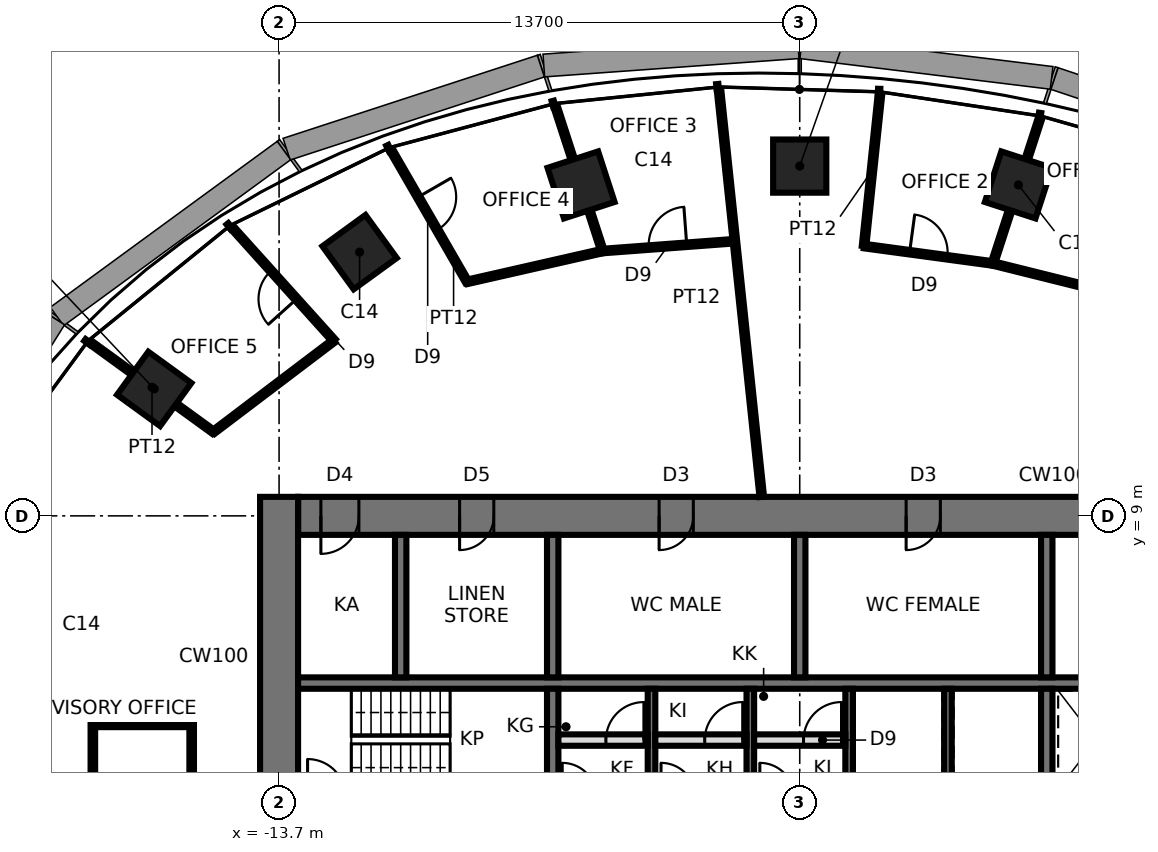
"""IFC4 building model, lengths in metres.
Left out: names, types, materials, properties, quantities, classifications, styles, units other than length and angle.
Written with IfcOpenShell. Run it as: python <this file> out.ifc"""

import sys

from ifc_helpers import new_model, si_unit, direction, frame, frame_2d, origin, origin_2d, place, context, subcontext, project, spatial, rectangle, extrude, element, fill, save


model = new_model("IFC4")
c1 = context("Model", 3, precision=1e-05, world=origin(), true_north=direction((0.0, 1.0)))
c2 = subcontext(c1, "Body", "Model", "MODEL_VIEW")
j1 = project(units=[si_unit("LENGTHUNIT", "METRE"), si_unit("PLANEANGLEUNIT", "RADIAN")], contexts=[c1])
p1 = place(None, origin())
s1 = spatial("IfcSite", under=j1, at=p1, CompositionType="ELEMENT")
p2 = place(p1, origin())
s2 = spatial("IfcBuilding", under=s1, at=p2, CompositionType="ELEMENT")
p3 = place(p2, frame((0.0, 0.0, 187.7)))
s3 = spatial("IfcBuildingStorey", under=s2, at=p3, CompositionType="ELEMENT", Elevation=187.7)
for number, where, z_axis, x_axis in (
    (1, (5.754, 17.708, 0.0), (0.0, 0.0, 1.0), (0.309, 0.951, 0.0)),
    (2, (0.0, 18.204, 0.0), (0.0, 0.0, 1.0), (0.0, 1.0, 0.0)),
    (3, (-5.754, 17.708, 0.0), (0.0, 0.0, 1.0), (-0.309, 0.951, 0.0)),
    (4, (-11.581, 15.94, 0.0), (0.0, 0.0, 1.0), (-0.588, 0.809, 0.0)),
    (5, (-16.986, 12.341, 0.0), (0.0, 0.0, 1.0), (-0.809, 0.588, 0.0)),
):
    element("IfcColumn", number, at=place(p3, frame(where, z_axis=z_axis, x_axis=x_axis)), inside=s3, PredefinedType="COLUMN", context=c2, shape_type="SweptSolid", body=[
        extrude(rectangle(XDim=1.4, YDim=1.4, at=origin_2d()), origin(), (0.0, 0.0, 1.0), 3.9),
    ])
p4 = place(p3, frame((13.2, 9.0, 0.0), z_axis=(0.0, 0.0, 1.0), x_axis=(-1.0, 0.0, 0.0)))
e6 = element("IfcWall", 6, at=p4, inside=s3, PredefinedType="SHEAR", context=c2, shape_type="SweptSolid", body=[
    extrude(rectangle(XDim=26.4, YDim=1.0, at=frame_2d((13.2, 0.0))), origin(), (0.0, 0.0, 1.0), 3.9),
])
p5 = place(p4, frame((2.65, 0.0, 0.0)))
e7 = element("IfcOpeningElement", 7, at=p5, cuts=e6, PredefinedType="OPENING", context=c2, shape_type="SweptSolid", body=[
    extrude(rectangle(XDim=0.9, YDim=2.1, at=frame_2d((0.45, 1.05))), frame((0.0, 0.51, 0.0), z_axis=(0.0, -1.0, 0.0), x_axis=(1.0, 0.0, 0.0)), (0.0, 0.0, 1.0), 1.02),
])
p6 = place(p4, frame((9.5, 0.0, 0.0)))
e8 = element("IfcOpeningElement", 8, at=p6, cuts=e6, PredefinedType="OPENING", context=c2, shape_type="SweptSolid", body=[
    extrude(rectangle(XDim=0.9, YDim=2.1, at=frame_2d((0.45, 1.05))), frame((0.0, 0.51, 0.0), z_axis=(0.0, -1.0, 0.0), x_axis=(1.0, 0.0, 0.0)), (0.0, 0.0, 1.0), 1.02),
])
p7 = place(p4, frame((16.0, 0.0, 0.0)))
e9 = element("IfcOpeningElement", 9, at=p7, cuts=e6, PredefinedType="OPENING", context=c2, shape_type="SweptSolid", body=[
    extrude(rectangle(XDim=0.9, YDim=2.1, at=frame_2d((0.45, 1.05))), frame((0.0, 0.51, 0.0), z_axis=(0.0, -1.0, 0.0), x_axis=(1.0, 0.0, 0.0)), (0.0, 0.0, 1.0), 1.02),
])
p8 = place(p4, frame((21.25, 0.0, 0.0)))
e10 = element("IfcOpeningElement", 10, at=p8, cuts=e6, PredefinedType="OPENING", context=c2, shape_type="SweptSolid", body=[
    extrude(rectangle(XDim=0.9, YDim=2.1, at=frame_2d((0.45, 1.05))), frame((0.0, 0.51, 0.0), z_axis=(0.0, -1.0, 0.0), x_axis=(1.0, 0.0, 0.0)), (0.0, 0.0, 1.0), 1.02),
])
p9 = place(p4, frame((24.8, 0.0, 0.0)))
e11 = element("IfcOpeningElement", 11, at=p9, cuts=e6, PredefinedType="OPENING", context=c2, shape_type="SweptSolid", body=[
    extrude(rectangle(XDim=1.0, YDim=2.1, at=frame_2d((0.5, 1.05))), frame((0.0, 0.51, 0.0), z_axis=(0.0, -1.0, 0.0), x_axis=(1.0, 0.0, 0.0)), (0.0, 0.0, 1.0), 1.02),
])
p10 = place(p3, frame((-13.7, 9.5, 0.0), z_axis=(0.0, 0.0, 1.0), x_axis=(0.0, -1.0, 0.0)))
e12 = element("IfcWall", 12, at=p10, inside=s3, PredefinedType="SHEAR", context=c2, shape_type="SweptSolid", body=[
    extrude(rectangle(XDim=19.0, YDim=1.0, at=frame_2d((9.5, 0.0))), origin(), (0.0, 0.0, 1.0), 3.9),
])
p11 = place(p10, frame((8.6, 0.0, 0.0)))
e13 = element("IfcOpeningElement", 13, at=p11, cuts=e12, PredefinedType="OPENING", context=c2, shape_type="SweptSolid", body=[
    extrude(rectangle(XDim=1.8, YDim=2.4, at=frame_2d((0.9, 1.2))), frame((0.0, 0.51, 0.0), z_axis=(0.0, -1.0, 0.0), x_axis=(1.0, 0.0, 0.0)), (0.0, 0.0, 1.0), 1.02),
])
p12 = place(p3, frame((-13.2, 4.6, 0.0), z_axis=(0.0, 0.0, 1.0), x_axis=(1.0, 0.0, 0.0)))
e14 = element("IfcWall", 14, at=p12, inside=s3, PredefinedType="SHEAR", context=c2, shape_type="SweptSolid", body=[
    extrude(rectangle(XDim=26.4, YDim=0.3, at=frame_2d((13.2, 0.0))), origin(), (0.0, 0.0, 1.0), 3.9),
])
p13 = place(p3, frame((-6.5, 1.75, 0.0), z_axis=(0.0, 0.0, 1.0), x_axis=(0.0, 1.0, 0.0)))
e15 = element("IfcWall", 15, at=p13, inside=s3, PredefinedType="SHEAR", context=c2, shape_type="SweptSolid", body=[
    extrude(rectangle(XDim=2.7, YDim=0.3, at=frame_2d((1.35, 0.0))), origin(), (0.0, 0.0, 1.0), 3.9),
])
p14 = place(p3, frame((-6.5, 4.75, 0.0), z_axis=(0.0, 0.0, 1.0), x_axis=(0.0, 1.0, 0.0)))
e16 = element("IfcWall", 16, at=p14, inside=s3, PredefinedType="SHEAR", context=c2, shape_type="SweptSolid", body=[
    extrude(rectangle(XDim=3.75, YDim=0.3, at=frame_2d((1.875, 0.0))), origin(), (0.0, 0.0, 1.0), 3.9),
])
p15 = place(p3, frame((6.5, 1.75, 0.0), z_axis=(0.0, 0.0, 1.0), x_axis=(0.0, 1.0, 0.0)))
e17 = element("IfcWall", 17, at=p15, inside=s3, PredefinedType="SHEAR", context=c2, shape_type="SweptSolid", body=[
    extrude(rectangle(XDim=2.7, YDim=0.3, at=frame_2d((1.35, 0.0))), origin(), (0.0, 0.0, 1.0), 3.9),
])
p16 = place(p3, frame((6.5, 4.75, 0.0), z_axis=(0.0, 0.0, 1.0), x_axis=(0.0, 1.0, 0.0)))
e18 = element("IfcWall", 18, at=p16, inside=s3, PredefinedType="SHEAR", context=c2, shape_type="SweptSolid", body=[
    extrude(rectangle(XDim=3.75, YDim=0.3, at=frame_2d((1.875, 0.0))), origin(), (0.0, 0.0, 1.0), 3.9),
])
for number, where, z_axis, x_axis in (
    (19, (-3.9, 1.75, 0.0), (0.0, 0.0, 1.0), (0.0, 1.0, 0.0)),
    (20, (-1.3, 1.75, 0.0), (0.0, 0.0, 1.0), (0.0, 1.0, 0.0)),
    (21, (1.3, 1.75, 0.0), (0.0, 0.0, 1.0), (0.0, 1.0, 0.0)),
    (22, (3.9, 1.75, 0.0), (0.0, 0.0, 1.0), (0.0, 1.0, 0.0)),
):
    element("IfcWall", number, at=place(p3, frame(where, z_axis=z_axis, x_axis=x_axis)), inside=s3, PredefinedType="SHEAR", context=c2, shape_type="SweptSolid", body=[
        extrude(rectangle(XDim=2.7, YDim=0.2, at=frame_2d((1.35, 0.0))), origin(), (0.0, 0.0, 1.0), 3.9),
    ])
for number, where, z_axis, x_axis in (
    (23, (0.0, 4.75, 0.0), (0.0, 0.0, 1.0), (0.0, 1.0, 0.0)),
    (24, (-10.5, 4.75, 0.0), (0.0, 0.0, 1.0), (0.0, 1.0, 0.0)),
):
    element("IfcWall", number, at=place(p3, frame(where, z_axis=z_axis, x_axis=x_axis)), inside=s3, PredefinedType="SHEAR", context=c2, shape_type="SweptSolid", body=[
        extrude(rectangle(XDim=3.75, YDim=0.3, at=frame_2d((1.875, 0.0))), origin(), (0.0, 0.0, 1.0), 3.9),
    ])
p17 = place(p3, frame((-6.35, 3.1, 0.0), z_axis=(0.0, 0.0, 1.0), x_axis=(1.0, 0.0, 0.0)))
e25 = element("IfcWall", 25, at=p17, inside=s3, PredefinedType="PARTITIONING", context=c2, shape_type="SweptSolid", body=[
    extrude(rectangle(XDim=2.35, YDim=0.3, at=frame_2d((1.175, 0.0))), origin(), (0.0, 0.0, 1.0), 3.74),
])
p18 = place(p17, frame((1.25, 0.0, 0.0)))
e26 = element("IfcOpeningElement", 26, at=p18, cuts=e25, PredefinedType="OPENING", context=c2, shape_type="SweptSolid", body=[
    extrude(rectangle(XDim=1.0, YDim=2.4, at=frame_2d((0.5, 1.2))), frame((0.0, 0.16, 0.0), z_axis=(0.0, -1.0, 0.0), x_axis=(1.0, 0.0, 0.0)), (0.0, 0.0, 1.0), 0.32),
])
p19 = place(p3, frame((-3.8, 3.1, 0.0), z_axis=(0.0, 0.0, 1.0), x_axis=(1.0, 0.0, 0.0)))
e27 = element("IfcWall", 27, at=p19, inside=s3, PredefinedType="PARTITIONING", context=c2, shape_type="SweptSolid", body=[
    extrude(rectangle(XDim=2.4, YDim=0.3, at=frame_2d((1.2, 0.0))), origin(), (0.0, 0.0, 1.0), 3.74),
])
p20 = place(p19, frame((1.3, 0.0, 0.0)))
e28 = element("IfcOpeningElement", 28, at=p20, cuts=e27, PredefinedType="OPENING", context=c2, shape_type="SweptSolid", body=[
    extrude(rectangle(XDim=1.0, YDim=2.4, at=frame_2d((0.5, 1.2))), frame((0.0, 0.16, 0.0), z_axis=(0.0, -1.0, 0.0), x_axis=(1.0, 0.0, 0.0)), (0.0, 0.0, 1.0), 0.32),
])
p21 = place(p3, frame((-1.2, 3.1, 0.0), z_axis=(0.0, 0.0, 1.0), x_axis=(1.0, 0.0, 0.0)))
e29 = element("IfcWall", 29, at=p21, inside=s3, PredefinedType="PARTITIONING", context=c2, shape_type="SweptSolid", body=[
    extrude(rectangle(XDim=2.4, YDim=0.3, at=frame_2d((1.2, 0.0))), origin(), (0.0, 0.0, 1.0), 3.74),
])
p22 = place(p21, frame((1.3, 0.0, 0.0)))
e30 = element("IfcOpeningElement", 30, at=p22, cuts=e29, PredefinedType="OPENING", context=c2, shape_type="SweptSolid", body=[
    extrude(rectangle(XDim=1.0, YDim=2.4, at=frame_2d((0.5, 1.2))), frame((0.0, 0.16, 0.0), z_axis=(0.0, -1.0, 0.0), x_axis=(1.0, 0.0, 0.0)), (0.0, 0.0, 1.0), 0.32),
])
p23 = place(p3, frame((5.082, 15.641, 0.0), z_axis=(0.0, 0.0, 1.0), x_axis=(0.970364132875, -0.241647366281, 0.0)))
e31 = element("IfcWall", 31, at=p23, inside=s3, PredefinedType="PARTITIONING", context=c2, shape_type="SweptSolid", body=[
    extrude(rectangle(XDim=3.557, YDim=0.12, at=frame_2d((1.779, 0.0))), origin(), (0.0, 0.0, 1.0), 3.74),
])
p24 = place(p3, frame((5.082, 15.641, 0.0), z_axis=(0.0, 0.0, 1.0), x_axis=(0.309022586479, 0.951054699292, 0.0)))
e32 = element("IfcWall", 32, at=p24, inside=s3, PredefinedType="PARTITIONING", context=c2, shape_type="SweptSolid", body=[
    extrude(rectangle(XDim=4.0, YDim=0.12, at=frame_2d((2.0, 0.0))), origin(), (0.0, 0.0, 1.0), 3.04),
])
p25 = place(p3, frame((1.692, 16.1, 0.0), z_axis=(0.0, 0.0, 1.0), x_axis=(0.990987566224, -0.133953886058, 0.0)))
e33 = element("IfcWall", 33, at=p25, inside=s3, PredefinedType="PARTITIONING", context=c2, shape_type="SweptSolid", body=[
    extrude(rectangle(XDim=3.421, YDim=0.12, at=frame_2d((1.71, 0.0))), origin(), (0.0, 0.0, 1.0), 3.74),
])
p26 = place(p25, frame((1.21, 0.0, 0.0)))
e34 = element("IfcOpeningElement", 34, at=p26, cuts=e33, PredefinedType="OPENING", context=c2, shape_type="SweptSolid", body=[
    extrude(rectangle(XDim=1.0, YDim=2.4, at=frame_2d((0.5, 1.2))), frame((0.0, 0.07, 0.0), z_axis=(0.0, -1.0, 0.0), x_axis=(1.0, 0.0, 0.0)), (0.0, 0.0, 1.0), 0.14),
])
p27 = place(p3, frame((2.11, 20.078, 0.0), z_axis=(0.0, 0.0, 1.0), x_axis=(-0.104548171712, -0.99451982373, 0.0)))
e35 = element("IfcWall", 35, at=p27, inside=s3, PredefinedType="PARTITIONING", context=c2, shape_type="SweptSolid", body=[
    extrude(rectangle(XDim=4.0, YDim=0.12, at=frame_2d((2.0, 0.0))), origin(), (0.0, 0.0, 1.0), 3.74),
])
p28 = place(p3, frame((-0.999, 9.5, 0.0), z_axis=(0.0, 0.0, 1.0), x_axis=(-0.10451834001, 0.994522959313, 0.0)))
e36 = element("IfcWall", 36, at=p28, inside=s3, PredefinedType="PARTITIONING", context=c2, shape_type="SweptSolid", body=[
    extrude(rectangle(XDim=10.766, YDim=0.12, at=frame_2d((5.383, 0.0))), origin(), (0.0, 0.0, 1.0), 3.74),
])
p29 = place(p3, frame((-5.188, 15.969, 0.0), z_axis=(0.0, 0.0, 1.0), x_axis=(0.997219476507, 0.074520572167, 0.0)))
e37 = element("IfcWall", 37, at=p29, inside=s3, PredefinedType="PARTITIONING", context=c2, shape_type="SweptSolid", body=[
    extrude(rectangle(XDim=3.492, YDim=0.12, at=frame_2d((1.746, 0.0))), origin(), (0.0, 0.0, 1.0), 3.74),
])
p30 = place(p29, frame((1.221, 0.0, 0.0)))
e38 = element("IfcOpeningElement", 38, at=p30, cuts=e37, PredefinedType="OPENING", context=c2, shape_type="SweptSolid", body=[
    extrude(rectangle(XDim=1.0, YDim=2.4, at=frame_2d((0.5, 1.2))), frame((0.0, 0.07, 0.0), z_axis=(0.0, -1.0, 0.0), x_axis=(1.0, 0.0, 0.0)), (0.0, 0.0, 1.0), 0.14),
])
p31 = place(p3, frame((-5.188, 15.969, 0.0), z_axis=(0.0, 0.0, 1.0), x_axis=(-0.309022586479, 0.951054699292, 0.0)))
e39 = element("IfcWall", 39, at=p31, inside=s3, PredefinedType="PARTITIONING", context=c2, shape_type="SweptSolid", body=[
    extrude(rectangle(XDim=4.0, YDim=0.12, at=frame_2d((2.0, 0.0))), origin(), (0.0, 0.0, 1.0), 3.04),
])
p32 = place(p3, frame((-8.751, 15.158, 0.0), z_axis=(0.0, 0.0, 1.0), x_axis=(0.975057981002, 0.221950295525, 0.0)))
e40 = element("IfcWall", 40, at=p32, inside=s3, PredefinedType="PARTITIONING", context=c2, shape_type="SweptSolid", body=[
    extrude(rectangle(XDim=3.654, YDim=0.12, at=frame_2d((1.827, 0.0))), origin(), (0.0, 0.0, 1.0), 3.74),
])
p33 = place(p3, frame((-10.751, 18.622, 0.0), z_axis=(0.0, 0.0, 1.0), x_axis=(0.49999894854, -0.866026010844, 0.0)))
e41 = element("IfcWall", 41, at=p33, inside=s3, PredefinedType="PARTITIONING", context=c2, shape_type="SweptSolid", body=[
    extrude(rectangle(XDim=4.0, YDim=0.12, at=frame_2d((2.0, 0.0))), origin(), (0.0, 0.0, 1.0), 3.74),
])
p34 = place(p33, frame((1.423, 0.0, 0.0)))
e42 = element("IfcOpeningElement", 42, at=p34, cuts=e41, PredefinedType="OPENING", context=c2, shape_type="SweptSolid", body=[
    extrude(rectangle(XDim=1.0, YDim=2.4, at=frame_2d((0.5, 1.2))), frame((0.0, 0.07, 0.0), z_axis=(0.0, -1.0, 0.0), x_axis=(1.0, 0.0, 0.0)), (0.0, 0.0, 1.0), 0.14),
])
p35 = place(p3, frame((-12.255, 13.61, 0.0), z_axis=(0.0, 0.0, 1.0), x_axis=(-0.669119832037, 0.743154526579, 0.0)))
e43 = element("IfcWall", 43, at=p35, inside=s3, PredefinedType="PARTITIONING", context=c2, shape_type="SweptSolid", body=[
    extrude(rectangle(XDim=4.0, YDim=0.12, at=frame_2d((2.0, 0.0))), origin(), (0.0, 0.0, 1.0), 3.74),
])
p36 = place(p35, frame((1.474, 0.0, 0.0)))
e44 = element("IfcOpeningElement", 44, at=p36, cuts=e43, PredefinedType="OPENING", context=c2, shape_type="SweptSolid", body=[
    extrude(rectangle(XDim=1.0, YDim=2.4, at=frame_2d((0.5, 1.2))), frame((0.0, 0.07, 0.0), z_axis=(0.0, -1.0, 0.0), x_axis=(1.0, 0.0, 0.0)), (0.0, 0.0, 1.0), 0.14),
])
p37 = place(p3, frame((-15.426, 11.208, 0.0), z_axis=(0.0, 0.0, 1.0), x_axis=(0.796992780537, 0.603988830834, 0.0)))
e45 = element("IfcWall", 45, at=p37, inside=s3, PredefinedType="PARTITIONING", context=c2, shape_type="SweptSolid", body=[
    extrude(rectangle(XDim=3.978, YDim=0.12, at=frame_2d((1.989, 0.0))), origin(), (0.0, 0.0, 1.0), 3.334),
])
p38 = place(p3, frame((-18.662, 13.559, 0.0), z_axis=(0.0, 0.0, 1.0), x_axis=(0.809026317077, -0.587772420479, 0.0)))
e46 = element("IfcWall", 46, at=p38, inside=s3, PredefinedType="PARTITIONING", context=c2, shape_type="SweptSolid", body=[
    extrude(rectangle(XDim=4.0, YDim=0.12, at=frame_2d((2.0, 0.0))), origin(), (0.0, 0.0, 1.0), 3.04),
])
p39 = place(p3, frame((-18.6, 3.5, 0.0), z_axis=(0.0, 0.0, 1.0), x_axis=(1.0, 0.0, 0.0)))
e47 = element("IfcWall", 47, at=p39, inside=s3, PredefinedType="PARTITIONING", context=c2, shape_type="SweptSolid", body=[
    extrude(rectangle(XDim=2.6, YDim=0.12, at=frame_2d((1.3, 0.0))), origin(), (0.0, 0.0, 1.0), 3.74),
])
p40 = place(p3, frame((-18.6, -3.5, 0.0), z_axis=(0.0, 0.0, 1.0), x_axis=(0.0, 1.0, 0.0)))
e48 = element("IfcWall", 48, at=p40, inside=s3, PredefinedType="PARTITIONING", context=c2, shape_type="SweptSolid", body=[
    extrude(rectangle(XDim=7.0, YDim=0.12, at=frame_2d((3.5, 0.0))), origin(), (0.0, 0.0, 1.0), 3.334),
])
p41 = place(p40, frame((3.0, 0.0, 0.0)))
e49 = element("IfcOpeningElement", 49, at=p41, cuts=e48, PredefinedType="OPENING", context=c2, shape_type="SweptSolid", body=[
    extrude(rectangle(XDim=1.0, YDim=2.4, at=frame_2d((0.5, 1.2))), frame((0.0, 0.07, 0.0), z_axis=(0.0, -1.0, 0.0), x_axis=(1.0, 0.0, 0.0)), (0.0, 0.0, 1.0), 0.14),
])
p42 = place(p3, frame((-16.0, 3.5, 0.0), z_axis=(0.0, 0.0, 1.0), x_axis=(0.0, -1.0, 0.0)))
e50 = element("IfcWall", 50, at=p42, inside=s3, PredefinedType="PARTITIONING", context=c2, shape_type="SweptSolid", body=[
    extrude(rectangle(XDim=7.0, YDim=0.12, at=frame_2d((3.5, 0.0))), origin(), (0.0, 0.0, 1.0), 3.74),
])
p43 = place(p18, origin())
e51 = element("IfcDoor", 51, at=p43, inside=s3, OperationType="SINGLE_SWING_RIGHT", PredefinedType="DOOR", context=c2, shape_type="SweptSolid", body=[
    extrude(rectangle(XDim=1.0, YDim=2.4, at=frame_2d((0.5, 1.2))), frame((0.0, 0.025, 0.0), z_axis=(0.0, -1.0, 0.0), x_axis=(1.0, 0.0, 0.0)), (0.0, 0.0, 1.0), 0.05),
])
fill(e26, e51)
p44 = place(p20, origin())
e52 = element("IfcDoor", 52, at=p44, inside=s3, OperationType="SINGLE_SWING_RIGHT", PredefinedType="DOOR", context=c2, shape_type="SweptSolid", body=[
    extrude(rectangle(XDim=1.0, YDim=2.4, at=frame_2d((0.5, 1.2))), frame((0.0, 0.025, 0.0), z_axis=(0.0, -1.0, 0.0), x_axis=(1.0, 0.0, 0.0)), (0.0, 0.0, 1.0), 0.05),
])
fill(e28, e52)
p45 = place(p22, origin())
e53 = element("IfcDoor", 53, at=p45, inside=s3, OperationType="SINGLE_SWING_RIGHT", PredefinedType="DOOR", context=c2, shape_type="SweptSolid", body=[
    extrude(rectangle(XDim=1.0, YDim=2.4, at=frame_2d((0.5, 1.2))), frame((0.0, 0.025, 0.0), z_axis=(0.0, -1.0, 0.0), x_axis=(1.0, 0.0, 0.0)), (0.0, 0.0, 1.0), 0.05),
])
fill(e30, e53)
p46 = place(p6, origin())
e54 = element("IfcDoor", 54, at=p46, inside=s3, OperationType="SINGLE_SWING_RIGHT", PredefinedType="DOOR", context=c2, shape_type="SweptSolid", body=[
    extrude(rectangle(XDim=0.82, YDim=2.06, at=frame_2d((0.45, 1.03))), frame((0.0, 0.025, 0.0), z_axis=(0.0, -1.0, 0.0), x_axis=(1.0, 0.0, 0.0)), (0.0, 0.0, 1.0), 0.05),
    extrude(rectangle(XDim=0.04, YDim=2.1, at=frame_2d((0.02, 1.05))), frame((0.0, 0.25, 0.0), z_axis=(0.0, -1.0, 0.0), x_axis=(1.0, 0.0, 0.0)), (0.0, 0.0, 1.0), 0.5),
    extrude(rectangle(XDim=0.04, YDim=2.1, at=frame_2d((0.88, 1.05))), frame((0.0, 0.25, 0.0), z_axis=(0.0, -1.0, 0.0), x_axis=(1.0, 0.0, 0.0)), (0.0, 0.0, 1.0), 0.5),
    extrude(rectangle(XDim=0.82, YDim=0.04, at=frame_2d((0.45, 2.08))), frame((0.0, 0.25, 0.0), z_axis=(0.0, -1.0, 0.0), x_axis=(1.0, 0.0, 0.0)), (0.0, 0.0, 1.0), 0.5),
])
fill(e8, e54)
p47 = place(p7, origin())
e55 = element("IfcDoor", 55, at=p47, inside=s3, OperationType="SINGLE_SWING_RIGHT", PredefinedType="DOOR", context=c2, shape_type="SweptSolid", body=[
    extrude(rectangle(XDim=0.82, YDim=2.06, at=frame_2d((0.45, 1.03))), frame((0.0, 0.025, 0.0), z_axis=(0.0, -1.0, 0.0), x_axis=(1.0, 0.0, 0.0)), (0.0, 0.0, 1.0), 0.05),
    extrude(rectangle(XDim=0.04, YDim=2.1, at=frame_2d((0.02, 1.05))), frame((0.0, 0.25, 0.0), z_axis=(0.0, -1.0, 0.0), x_axis=(1.0, 0.0, 0.0)), (0.0, 0.0, 1.0), 0.5),
    extrude(rectangle(XDim=0.04, YDim=2.1, at=frame_2d((0.88, 1.05))), frame((0.0, 0.25, 0.0), z_axis=(0.0, -1.0, 0.0), x_axis=(1.0, 0.0, 0.0)), (0.0, 0.0, 1.0), 0.5),
    extrude(rectangle(XDim=0.82, YDim=0.04, at=frame_2d((0.45, 2.08))), frame((0.0, 0.25, 0.0), z_axis=(0.0, -1.0, 0.0), x_axis=(1.0, 0.0, 0.0)), (0.0, 0.0, 1.0), 0.5),
])
fill(e9, e55)
p48 = place(p8, origin())
e56 = element("IfcDoor", 56, at=p48, inside=s3, OperationType="SINGLE_SWING_RIGHT", PredefinedType="DOOR", context=c2, shape_type="SweptSolid", body=[
    extrude(rectangle(XDim=0.82, YDim=2.06, at=frame_2d((0.45, 1.03))), frame((0.0, 0.025, 0.0), z_axis=(0.0, -1.0, 0.0), x_axis=(1.0, 0.0, 0.0)), (0.0, 0.0, 1.0), 0.05),
    extrude(rectangle(XDim=0.04, YDim=2.1, at=frame_2d((0.02, 1.05))), frame((0.0, 0.25, 0.0), z_axis=(0.0, -1.0, 0.0), x_axis=(1.0, 0.0, 0.0)), (0.0, 0.0, 1.0), 0.5),
    extrude(rectangle(XDim=0.04, YDim=2.1, at=frame_2d((0.88, 1.05))), frame((0.0, 0.25, 0.0), z_axis=(0.0, -1.0, 0.0), x_axis=(1.0, 0.0, 0.0)), (0.0, 0.0, 1.0), 0.5),
    extrude(rectangle(XDim=0.82, YDim=0.04, at=frame_2d((0.45, 2.08))), frame((0.0, 0.25, 0.0), z_axis=(0.0, -1.0, 0.0), x_axis=(1.0, 0.0, 0.0)), (0.0, 0.0, 1.0), 0.5),
])
fill(e10, e56)
p49 = place(p9, origin())
e57 = element("IfcDoor", 57, at=p49, inside=s3, OperationType="SINGLE_SWING_RIGHT", PredefinedType="DOOR", context=c2, shape_type="SweptSolid", body=[
    extrude(rectangle(XDim=0.92, YDim=2.06, at=frame_2d((0.5, 1.03))), frame((0.0, 0.025, 0.0), z_axis=(0.0, -1.0, 0.0), x_axis=(1.0, 0.0, 0.0)), (0.0, 0.0, 1.0), 0.05),
    extrude(rectangle(XDim=0.04, YDim=2.1, at=frame_2d((0.02, 1.05))), frame((0.0, 0.25, 0.0), z_axis=(0.0, -1.0, 0.0), x_axis=(1.0, 0.0, 0.0)), (0.0, 0.0, 1.0), 0.5),
    extrude(rectangle(XDim=0.04, YDim=2.1, at=frame_2d((0.98, 1.05))), frame((0.0, 0.25, 0.0), z_axis=(0.0, -1.0, 0.0), x_axis=(1.0, 0.0, 0.0)), (0.0, 0.0, 1.0), 0.5),
    extrude(rectangle(XDim=0.92, YDim=0.04, at=frame_2d((0.5, 2.08))), frame((0.0, 0.25, 0.0), z_axis=(0.0, -1.0, 0.0), x_axis=(1.0, 0.0, 0.0)), (0.0, 0.0, 1.0), 0.5),
])
fill(e11, e57)
p50 = place(p26, origin())
e58 = element("IfcDoor", 58, at=p50, inside=s3, OperationType="SINGLE_SWING_LEFT", PredefinedType="DOOR", context=c2, shape_type="SweptSolid", body=[
    extrude(rectangle(XDim=1.0, YDim=2.4, at=frame_2d((0.5, 1.2))), frame((0.0, 0.025, 0.0), z_axis=(0.0, -1.0, 0.0), x_axis=(1.0, 0.0, 0.0)), (0.0, 0.0, 1.0), 0.05),
])
fill(e34, e58)
p51 = place(p30, origin())
e59 = element("IfcDoor", 59, at=p51, inside=s3, OperationType="SINGLE_SWING_RIGHT", PredefinedType="DOOR", context=c2, shape_type="SweptSolid", body=[
    extrude(rectangle(XDim=1.0, YDim=2.4, at=frame_2d((0.5, 1.2))), frame((0.0, 0.025, 0.0), z_axis=(0.0, -1.0, 0.0), x_axis=(1.0, 0.0, 0.0)), (0.0, 0.0, 1.0), 0.05),
])
fill(e38, e59)
p52 = place(p34, origin())
e60 = element("IfcDoor", 60, at=p52, inside=s3, OperationType="SINGLE_SWING_LEFT", PredefinedType="DOOR", context=c2, shape_type="SweptSolid", body=[
    extrude(rectangle(XDim=1.0, YDim=2.4, at=frame_2d((0.5, 1.2))), frame((0.0, 0.025, 0.0), z_axis=(0.0, -1.0, 0.0), x_axis=(1.0, 0.0, 0.0)), (0.0, 0.0, 1.0), 0.05),
])
fill(e42, e60)
p53 = place(p36, origin())
e61 = element("IfcDoor", 61, at=p53, inside=s3, OperationType="SINGLE_SWING_LEFT", PredefinedType="DOOR", context=c2, shape_type="SweptSolid", body=[
    extrude(rectangle(XDim=1.0, YDim=2.4, at=frame_2d((0.5, 1.2))), frame((0.0, 0.025, 0.0), z_axis=(0.0, -1.0, 0.0), x_axis=(1.0, 0.0, 0.0)), (0.0, 0.0, 1.0), 0.05),
])
fill(e44, e61)
save(model, sys.argv[1])
